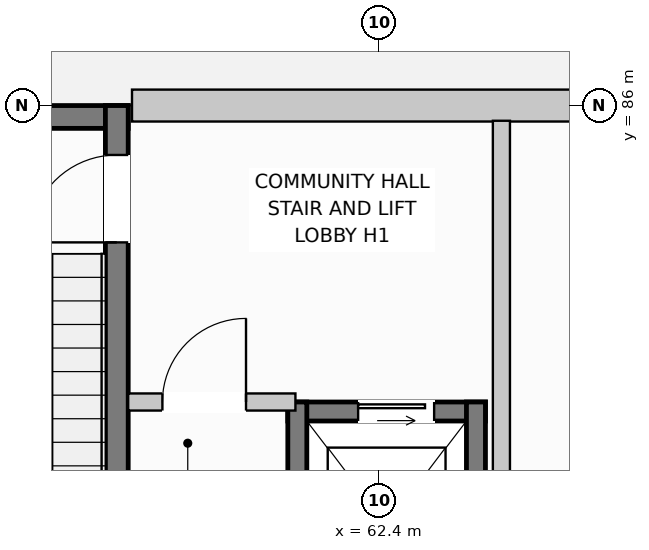
"""IFC4 building model, lengths in metres.
Left out: names, types, materials, properties, quantities, classifications, styles, units other than length and angle.
Written with IfcOpenShell. Run it as: python <this file> out.ifc"""

import sys

from ifc_helpers import new_model, si_unit, direction, frame, frame_2d, origin, origin_with_axes, place, context, subcontext, project, spatial, rectangle, extrude, element, fill, save


model = new_model("IFC4")
c1 = context("Model", 3, precision=1e-05, world=origin(), true_north=direction((0.0, 1.0)))
c2 = subcontext(c1, "Body", "Model", "MODEL_VIEW")
j1 = project(units=[si_unit("LENGTHUNIT", "METRE"), si_unit("PLANEANGLEUNIT", "RADIAN")], contexts=[c1])
p1 = place(None, origin())
s1 = spatial("IfcSite", under=j1, at=p1, CompositionType="ELEMENT")
p2 = place(p1, origin())
s2 = spatial("IfcBuilding", under=s1, at=p2, CompositionType="ELEMENT")
p3 = place(p2, origin())
s3 = spatial("IfcBuildingStorey", under=s2, at=p3, CompositionType="ELEMENT", Elevation=0.0)
p4 = place(p3, frame((59.15, 86.0, 0.0), z_axis=(0.0, 0.0, 1.0), x_axis=(1.0, 0.0, 0.0)))
e1 = element("IfcWall", 1, at=p4, inside=s3, PredefinedType="STANDARD", context=c2, shape_type="SweptSolid", body=[
    extrude(rectangle(XDim=44.9, YDim=0.42, at=frame_2d((22.45, 0.0))), origin(), (0.0, 0.0, 1.0), 3.21),
])
p5 = place(p4, frame((5.8, 0.0, 0.72)))
e2 = element("IfcOpeningElement", 2, at=p5, cuts=e1, PredefinedType="OPENING", context=c2, shape_type="SweptSolid", body=[
    extrude(rectangle(XDim=2.4, YDim=1.95, at=frame_2d((1.2, 0.975))), frame((0.0, 0.222, 0.0), z_axis=(0.0, -1.0, 0.0), x_axis=(1.0, 0.0, 0.0)), (0.0, 0.0, 1.0), 0.444),
])
p6 = place(p4, frame((20.8, 0.0, 0.72)))
e3 = element("IfcOpeningElement", 3, at=p6, cuts=e1, PredefinedType="OPENING", context=c2, shape_type="SweptSolid", body=[
    extrude(rectangle(XDim=2.4, YDim=1.95, at=frame_2d((1.2, 0.975))), frame((0.0, 0.222, 0.0), z_axis=(0.0, -1.0, 0.0), x_axis=(1.0, 0.0, 0.0)), (0.0, 0.0, 1.0), 0.444),
])
p7 = place(p4, frame((37.005, 0.0, 0.72)))
e4 = element("IfcOpeningElement", 4, at=p7, cuts=e1, PredefinedType="OPENING", context=c2, shape_type="SweptSolid", body=[
    extrude(rectangle(XDim=1.8, YDim=1.7, at=frame_2d((0.9, 0.85))), frame((0.0, 0.222, 0.0), z_axis=(0.0, -1.0, 0.0), x_axis=(1.0, 0.0, 0.0)), (0.0, 0.0, 1.0), 0.444),
])
p8 = place(p3, frame((55.5, 85.85, 0.0), z_axis=(0.0, 0.0, 1.0), x_axis=(1.0, 0.0, 0.0)))
e5 = element("IfcWall", 5, at=p8, inside=s3, PredefinedType="SHEAR", context=c2, shape_type="SweptSolid", body=[
    extrude(rectangle(XDim=3.6, YDim=0.3, at=frame_2d((1.8, 0.0))), origin(), (0.0, 0.0, 1.0), 4.12),
])
p9 = place(p8, frame((1.1, 0.0, 0.0)))
e6 = element("IfcOpeningElement", 6, at=p9, cuts=e5, PredefinedType="OPENING", context=c2, shape_type="SweptSolid", body=[
    extrude(rectangle(XDim=1.4, YDim=2.25, at=frame_2d((0.7, 1.125))), frame((0.0, 0.162, 0.0), z_axis=(0.0, -1.0, 0.0), x_axis=(1.0, 0.0, 0.0)), (0.0, 0.0, 1.0), 0.324),
])
p10 = place(p3, frame((58.95, 78.5, 0.0), z_axis=(0.0, 0.0, 1.0), x_axis=(0.0, 1.0, 0.0)))
e7 = element("IfcWall", 7, at=p10, inside=s3, PredefinedType="SHEAR", context=c2, shape_type="SweptSolid", body=[
    extrude(rectangle(XDim=7.5, YDim=0.3, at=frame_2d((3.75, 0.0))), origin(), (0.0, 0.0, 1.0), 4.12),
])
p11 = place(p10, frame((5.7, 0.0, 0.0)))
e8 = element("IfcOpeningElement", 8, at=p11, cuts=e7, PredefinedType="OPENING", context=c2, shape_type="SweptSolid", body=[
    extrude(rectangle(XDim=1.15, YDim=2.15, at=frame_2d((0.575, 1.075))), frame((0.0, 0.162, 0.0), z_axis=(0.0, -1.0, 0.0), x_axis=(1.0, 0.0, 0.0)), (0.0, 0.0, 1.0), 0.324),
])
p12 = place(p3, frame((61.2, 81.975, 0.0), z_axis=(0.0, 0.0, 1.0), x_axis=(1.0, 0.0, 0.0)))
e9 = element("IfcWall", 9, at=p12, inside=s3, PredefinedType="SHEAR", context=c2, shape_type="SweptSolid", body=[
    extrude(rectangle(XDim=2.6, YDim=0.25, at=frame_2d((1.3, 0.0))), origin(), (0.0, 0.0, 1.0), 4.12),
])
p13 = place(p12, frame((0.925, 0.0, 0.0)))
e10 = element("IfcOpeningElement", 10, at=p13, cuts=e9, PredefinedType="OPENING", context=c2, shape_type="SweptSolid", body=[
    extrude(rectangle(XDim=1.0, YDim=2.1, at=frame_2d((0.5, 1.05))), frame((0.0, 0.137, 0.0), z_axis=(0.0, -1.0, 0.0), x_axis=(1.0, 0.0, 0.0)), (0.0, 0.0, 1.0), 0.274),
])
for number, where, z_axis, x_axis in (
    (11, (61.325, 78.85, 0.0), (0.0, 0.0, 1.0), (0.0, 1.0, 0.0)),
    (12, (63.675, 78.85, 0.0), (0.0, 0.0, 1.0), (0.0, 1.0, 0.0)),
):
    element("IfcWall", number, at=place(p3, frame(where, z_axis=z_axis, x_axis=x_axis)), inside=s3, PredefinedType="SHEAR", context=c2, shape_type="SweptSolid", body=[
        extrude(rectangle(XDim=3.25, YDim=0.25, at=frame_2d((1.625, 0.0))), origin(), (0.0, 0.0, 1.0), 4.12),
    ])
p14 = place(p3, frame((64.01, 78.2, 0.0), z_axis=(0.0, 0.0, 1.0), x_axis=(0.0, 1.0, 0.0)))
e13 = element("IfcWall", 13, at=p14, inside=s3, PredefinedType="PARTITIONING", context=c2, shape_type="SweptSolid", body=[
    extrude(rectangle(XDim=7.6, YDim=0.225, at=frame_2d((3.8, 0.0))), origin(), (0.0, 0.0, 1.0), 4.12),
])
p15 = place(p3, frame((59.1, 82.1, 0.0), z_axis=(0.0, 0.0, 1.0), x_axis=(1.0, 0.0, 0.0)))
e14 = element("IfcWall", 14, at=p15, inside=s3, PredefinedType="PARTITIONING", context=c2, shape_type="SweptSolid", body=[
    extrude(rectangle(XDim=2.2, YDim=0.225, at=frame_2d((1.1, 0.0))), origin(), (0.0, 0.0, 1.0), 4.12),
])
p16 = place(p15, frame((0.45, 0.0, 0.0)))
e15 = element("IfcOpeningElement", 15, at=p16, cuts=e14, PredefinedType="OPENING", context=c2, shape_type="SweptSolid", body=[
    extrude(rectangle(XDim=1.1, YDim=2.15, at=frame_2d((0.55, 1.075))), frame((0.0, 0.125, 0.0), z_axis=(0.0, -1.0, 0.0), x_axis=(1.0, 0.0, 0.0)), (0.0, 0.0, 1.0), 0.249),
])
p17 = place(p11, origin_with_axes())
e16 = element("IfcDoor", 16, at=p17, inside=s3, OperationType="SINGLE_SWING_LEFT", PredefinedType="DOOR", context=c2, shape_type="SweptSolid", body=[
    extrude(rectangle(XDim=1.15, YDim=2.15, at=frame_2d((0.575, 1.075))), frame((0.0, 0.025, 0.0), z_axis=(0.0, -1.0, 0.0), x_axis=(1.0, 0.0, 0.0)), (0.0, 0.0, 1.0), 0.05),
])
fill(e8, e16)
p18 = place(p13, origin_with_axes())
e17 = element("IfcDoor", 17, at=p18, inside=s3, OperationType="SLIDING_TO_LEFT", PredefinedType="DOOR", context=c2, shape_type="SweptSolid", body=[
    extrude(rectangle(XDim=1.0, YDim=2.1, at=frame_2d((0.5, 1.05))), frame((0.0, 0.025, 0.0), z_axis=(0.0, -1.0, 0.0), x_axis=(1.0, 0.0, 0.0)), (0.0, 0.0, 1.0), 0.05),
])
fill(e10, e17)
p19 = place(p16, origin_with_axes())
e18 = element("IfcDoor", 18, at=p19, inside=s3, OperationType="SINGLE_SWING_RIGHT", PredefinedType="DOOR", context=c2, shape_type="SweptSolid", body=[
    extrude(rectangle(XDim=1.1, YDim=2.15, at=frame_2d((0.55, 1.075))), frame((0.0, 0.025, 0.0), z_axis=(0.0, -1.0, 0.0), x_axis=(1.0, 0.0, 0.0)), (0.0, 0.0, 1.0), 0.05),
])
fill(e15, e18)
save(model, sys.argv[1])
